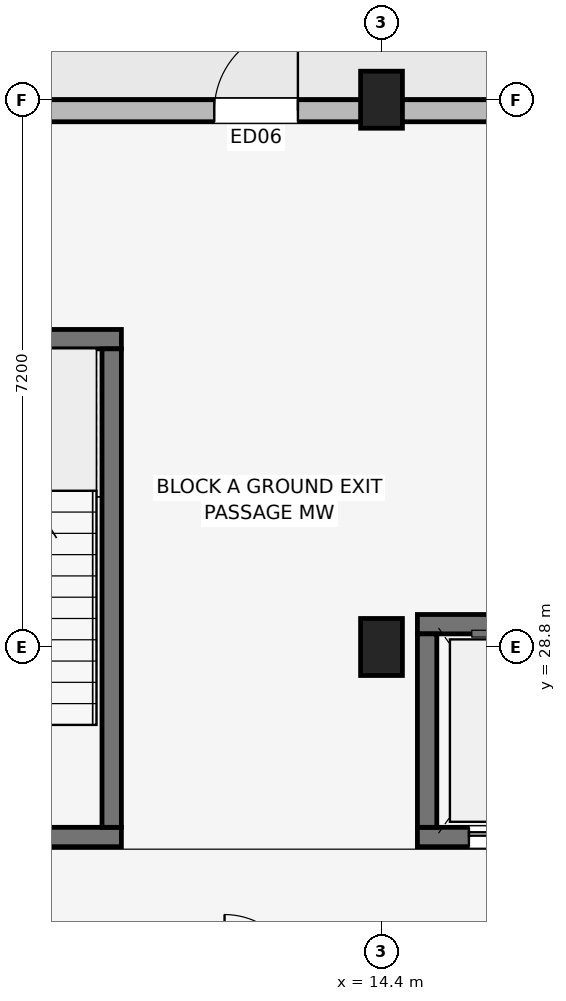
"""IFC4 building model, lengths in metres.
Left out: names, types, materials, properties, quantities, classifications, styles, units other than length and angle.
Written with IfcOpenShell. Run it as: python <this file> out.ifc"""

import sys

from ifc_helpers import new_model, si_unit, direction, frame, frame_2d, origin, origin_2d, place, context, subcontext, project, spatial, rectangle, extrude, element, fill, save


model = new_model("IFC4")
c1 = context("Model", 3, precision=1e-05, world=origin(), true_north=direction((0.0, 1.0)))
c2 = subcontext(c1, "Body", "Model", "MODEL_VIEW")
j1 = project(units=[si_unit("LENGTHUNIT", "METRE"), si_unit("PLANEANGLEUNIT", "RADIAN")], contexts=[c1])
p1 = place(None, origin())
s1 = spatial("IfcSite", under=j1, at=p1, CompositionType="ELEMENT")
p2 = place(p1, origin())
s2 = spatial("IfcBuilding", under=s1, at=p2, CompositionType="ELEMENT")
p3 = place(p2, origin())
s3 = spatial("IfcBuildingStorey", under=s2, at=p3, CompositionType="ELEMENT", Elevation=0.0)
for number, where, z_axis, x_axis in (
    (1, (14.4, 28.8, 0.0), (0.0, 0.0, 1.0), (1.0, 0.0, 0.0)),
    (2, (14.4, 36.0, 0.0), (0.0, 0.0, 1.0), (1.0, 0.0, 0.0)),
):
    element("IfcColumn", number, at=place(p3, frame(where, z_axis=z_axis, x_axis=x_axis)), inside=s3, PredefinedType="COLUMN", context=c2, shape_type="SweptSolid", body=[
        extrude(rectangle(XDim=0.55, YDim=0.75, at=origin_2d()), origin(), (0.0, 0.0, 1.0), 4.5),
    ])
p4 = place(p3, frame((7.673, 26.3, 0.0), z_axis=(0.0, 0.0, 1.0), x_axis=(1.0, 0.0, 0.0)))
e3 = element("IfcWall", 3, at=p4, inside=s3, PredefinedType="SHEAR", context=c2, shape_type="SweptSolid", body=[
    extrude(rectangle(XDim=3.305, YDim=0.255, at=frame_2d((1.652, 0.0))), origin(), (0.0, 0.0, 1.0), 4.5),
])
p5 = place(p4, frame((2.177, 0.0, 0.0), z_axis=(0.0, 0.0, 1.0), x_axis=(-1.0, 0.0, 0.0)))
e4 = element("IfcOpeningElement", 4, at=p5, cuts=e3, PredefinedType="OPENING", context=c2, shape_type="SweptSolid", body=[
    extrude(rectangle(XDim=1.05, YDim=2.12, at=frame_2d((0.525, 1.06))), frame((0.0, 0.137, 0.0), z_axis=(0.0, -1.0, 0.0), x_axis=(1.0, 0.0, 0.0)), (0.0, 0.0, 1.0), 0.275),
])
p6 = place(p3, frame((7.673, 32.85, 0.0), z_axis=(0.0, 0.0, 1.0), x_axis=(1.0, 0.0, 0.0)))
e5 = element("IfcWall", 5, at=p6, inside=s3, PredefinedType="SHEAR", context=c2, shape_type="SweptSolid", body=[
    extrude(rectangle(XDim=3.305, YDim=0.255, at=frame_2d((1.652, 0.0))), origin(), (0.0, 0.0, 1.0), 4.5),
])
p7 = place(p3, frame((10.85, 26.427, 0.0), z_axis=(0.0, 0.0, 1.0), x_axis=(0.0, 1.0, 0.0)))
e6 = element("IfcWall", 6, at=p7, inside=s3, PredefinedType="SHEAR", context=c2, shape_type="SweptSolid", body=[
    extrude(rectangle(XDim=6.295, YDim=0.255, at=frame_2d((3.147, 0.0))), origin(), (0.0, 0.0, 1.0), 4.5),
])
p8 = place(p3, frame((14.873, 26.3, 0.0), z_axis=(0.0, 0.0, 1.0), x_axis=(1.0, 0.0, 0.0)))
e7 = element("IfcWall", 7, at=p8, inside=s3, PredefinedType="SHEAR", context=c2, shape_type="SweptSolid", body=[
    extrude(rectangle(XDim=2.455, YDim=0.255, at=frame_2d((1.228, 0.0))), origin(), (0.0, 0.0, 1.0), 4.5),
])
p9 = place(p8, frame((0.677, 0.0, 0.0)))
e8 = element("IfcOpeningElement", 8, at=p9, cuts=e7, PredefinedType="OPENING", context=c2, shape_type="SweptSolid", body=[
    extrude(rectangle(XDim=1.1, YDim=2.15, at=frame_2d((0.55, 1.075))), frame((0.0, 0.137, 0.0), z_axis=(0.0, -1.0, 0.0), x_axis=(1.0, 0.0, 0.0)), (0.0, 0.0, 1.0), 0.275),
])
p10 = place(p3, frame((14.873, 29.1, 0.0), z_axis=(0.0, 0.0, 1.0), x_axis=(1.0, 0.0, 0.0)))
e9 = element("IfcWall", 9, at=p10, inside=s3, PredefinedType="SHEAR", context=c2, shape_type="SweptSolid", body=[
    extrude(rectangle(XDim=2.455, YDim=0.255, at=frame_2d((1.228, 0.0))), origin(), (0.0, 0.0, 1.0), 4.5),
])
p11 = place(p3, frame((15.0, 26.427, 0.0), z_axis=(0.0, 0.0, 1.0), x_axis=(0.0, 1.0, 0.0)))
e10 = element("IfcWall", 10, at=p11, inside=s3, PredefinedType="SHEAR", context=c2, shape_type="SweptSolid", body=[
    extrude(rectangle(XDim=2.545, YDim=0.255, at=frame_2d((1.272, 0.0))), origin(), (0.0, 0.0, 1.0), 4.5),
])
p12 = place(p3, frame((32.6, 35.855, 0.0), z_axis=(0.0, 0.0, 1.0), x_axis=(-1.0, 0.0, 0.0)))
e11 = element("IfcWall", 11, at=p12, inside=s3, PredefinedType="SOLIDWALL", context=c2, shape_type="SweptSolid", body=[
    extrude(rectangle(XDim=29.2, YDim=0.29, at=frame_2d((14.6, 0.0))), origin(), (0.0, 0.0, 1.0), 3.53),
])
p13 = place(p12, frame((20.4, 0.0, 0.0), z_axis=(0.0, 0.0, 1.0), x_axis=(-1.0, 0.0, 0.0)))
e12 = element("IfcOpeningElement", 12, at=p13, cuts=e11, PredefinedType="OPENING", context=c2, shape_type="SweptSolid", body=[
    extrude(rectangle(XDim=1.1, YDim=2.15, at=frame_2d((0.55, 1.075))), frame((0.0, 0.155, 0.0), z_axis=(0.0, -1.0, 0.0), x_axis=(1.0, 0.0, 0.0)), (0.0, 0.0, 1.0), 0.31),
])
p14 = place(p12, frame((9.8, 0.0, 0.0), z_axis=(0.0, 0.0, 1.0), x_axis=(-1.0, 0.0, 0.0)))
e13 = element("IfcOpeningElement", 13, at=p14, cuts=e11, PredefinedType="OPENING", context=c2, shape_type="SweptSolid", body=[
    extrude(rectangle(XDim=1.1, YDim=2.15, at=frame_2d((0.55, 1.075))), frame((0.0, 0.155, 0.0), z_axis=(0.0, -1.0, 0.0), x_axis=(1.0, 0.0, 0.0)), (0.0, 0.0, 1.0), 0.31),
])
p15 = place(p12, frame((0.897, 0.0, 0.7)))
e14 = element("IfcOpeningElement", 14, at=p15, cuts=e11, PredefinedType="OPENING", context=c2, shape_type="SweptSolid", body=[
    extrude(rectangle(XDim=1.86, YDim=1.6, at=frame_2d((0.93, 0.8))), frame((0.0, 0.155, 0.0), z_axis=(0.0, -1.0, 0.0), x_axis=(1.0, 0.0, 0.0)), (0.0, 0.0, 1.0), 0.31),
])
p16 = place(p12, frame((26.373, 0.0, 0.7)))
e15 = element("IfcOpeningElement", 15, at=p16, cuts=e11, PredefinedType="OPENING", context=c2, shape_type="SweptSolid", body=[
    extrude(rectangle(XDim=2.0, YDim=1.65, at=frame_2d((1.0, 0.825))), frame((0.0, 0.155, 0.0), z_axis=(0.0, -1.0, 0.0), x_axis=(1.0, 0.0, 0.0)), (0.0, 0.0, 1.0), 0.31),
])
p17 = place(p13, origin())
e16 = element("IfcDoor", 16, at=p17, inside=s3, OperationType="SINGLE_SWING_LEFT", PredefinedType="DOOR", context=c2, shape_type="SweptSolid", body=[
    extrude(rectangle(XDim=1.1, YDim=2.15, at=frame_2d((0.55, 1.075))), frame((0.0, 0.025, 0.0), z_axis=(0.0, -1.0, 0.0), x_axis=(1.0, 0.0, 0.0)), (0.0, 0.0, 1.0), 0.05),
])
fill(e12, e16)
p18 = place(p9, origin())
e17 = element("IfcDoor", 17, at=p18, inside=s3, OperationType="SLIDING_TO_LEFT", PredefinedType="DOOR", context=c2, shape_type="SweptSolid", body=[
    extrude(rectangle(XDim=1.1, YDim=2.15, at=frame_2d((0.55, 1.075))), frame((0.0, 0.025, 0.0), z_axis=(0.0, -1.0, 0.0), x_axis=(1.0, 0.0, 0.0)), (0.0, 0.0, 1.0), 0.05),
])
fill(e8, e17)
save(model, sys.argv[1])
